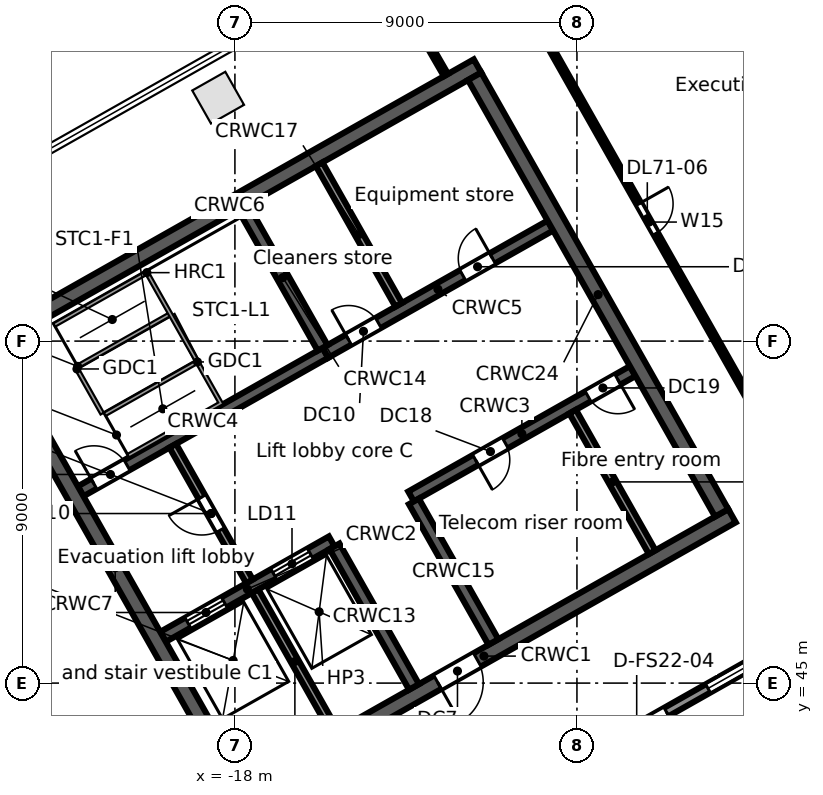
"""IFC4 building model, lengths in metres.
Left out: names, types, materials, properties, quantities, classifications, styles, units other than length and angle.
Written with IfcOpenShell. Run it as: python <this file> out.ifc"""

import sys

from ifc_helpers import new_model, si_unit, direction, frame, frame_2d, origin, origin_2d, place, context, subcontext, project, spatial, rectangle, extrude, element, fill, save


model = new_model("IFC4")
c1 = context("Model", 3, precision=1e-05, world=origin(), true_north=direction((0.0, 1.0)))
c2 = subcontext(c1, "Body", "Model", "MODEL_VIEW")
j1 = project(units=[si_unit("LENGTHUNIT", "METRE"), si_unit("PLANEANGLEUNIT", "RADIAN")], contexts=[c1])
p1 = place(None, origin())
s1 = spatial("IfcSite", under=j1, at=p1, CompositionType="ELEMENT")
p2 = place(p1, origin())
s2 = spatial("IfcBuilding", under=s1, at=p2, CompositionType="ELEMENT")
p3 = place(p2, frame((0.0, 0.0, 324.1)))
s3 = spatial("IfcBuildingStorey", under=s2, at=p3, CompositionType="ELEMENT", Elevation=324.1)
p4 = place(p3, frame((-18.441, 60.406, 0.0), z_axis=(0.0, 0.0, 1.0), x_axis=(-0.87035569594, -0.492423560103, 0.0)))
e1 = element("IfcColumn", 1, at=p4, inside=s3, PredefinedType="COLUMN", context=c2, shape_type="SweptSolid", body=[
    extrude(rectangle(XDim=1.0, YDim=1.0, at=origin_2d()), origin(), (0.0, 0.0, 1.0), 3.8),
])
p5 = place(p3, frame((-3.017, 46.293, 0.0), z_axis=(0.0, 0.0, 1.0), x_axis=(-0.870355474887, -0.492423950812, 0.0)))
e2 = element("IfcWall", 2, at=p5, inside=s3, PredefinedType="STANDARD", context=c2, shape_type="SweptSolid", body=[
    extrude(rectangle(XDim=40.34, YDim=0.25, at=frame_2d((20.17, 0.0))), origin(), (0.0, 0.0, 1.0), 3.52),
])
p6 = place(p5, frame((37.428, 0.0, 0.8)))
e3 = element("IfcOpeningElement", 3, at=p6, cuts=e2, PredefinedType="OPENING", context=c2, shape_type="SweptSolid", body=[
    extrude(rectangle(XDim=2.4, YDim=2.2, at=frame_2d((1.2, 1.1))), frame((0.0, 0.135, 0.0), z_axis=(0.0, -1.0, 0.0), x_axis=(1.0, 0.0, 0.0)), (0.0, 0.0, 1.0), 0.27),
])
p7 = place(p5, frame((34.372, 0.0, 0.0)))
e4 = element("IfcOpeningElement", 4, at=p7, cuts=e2, PredefinedType="OPENING", context=c2, shape_type="SweptSolid", body=[
    extrude(rectangle(XDim=1.8, YDim=2.4, at=frame_2d((0.9, 1.2))), frame((0.0, 0.135, 0.0), z_axis=(0.0, -1.0, 0.0), x_axis=(1.0, 0.0, 0.0)), (0.0, 0.0, 1.0), 0.27),
])
p8 = place(p5, frame((30.716, 0.0, 0.8)))
e5 = element("IfcOpeningElement", 5, at=p8, cuts=e2, PredefinedType="OPENING", context=c2, shape_type="SweptSolid", body=[
    extrude(rectangle(XDim=2.4, YDim=2.2, at=frame_2d((1.2, 1.1))), frame((0.0, 0.135, 0.0), z_axis=(0.0, -1.0, 0.0), x_axis=(1.0, 0.0, 0.0)), (0.0, 0.0, 1.0), 0.27),
])
p9 = place(p5, frame((27.36, 0.0, 0.8)))
e6 = element("IfcOpeningElement", 6, at=p9, cuts=e2, PredefinedType="OPENING", context=c2, shape_type="SweptSolid", body=[
    extrude(rectangle(XDim=2.4, YDim=2.2, at=frame_2d((1.2, 1.1))), frame((0.0, 0.135, 0.0), z_axis=(0.0, -1.0, 0.0), x_axis=(1.0, 0.0, 0.0)), (0.0, 0.0, 1.0), 0.27),
])
p10 = place(p5, frame((24.304, 0.0, 0.0)))
e7 = element("IfcOpeningElement", 7, at=p10, cuts=e2, PredefinedType="OPENING", context=c2, shape_type="SweptSolid", body=[
    extrude(rectangle(XDim=1.8, YDim=2.4, at=frame_2d((0.9, 1.2))), frame((0.0, 0.135, 0.0), z_axis=(0.0, -1.0, 0.0), x_axis=(1.0, 0.0, 0.0)), (0.0, 0.0, 1.0), 0.27),
])
p11 = place(p5, frame((20.648, 0.0, 0.8)))
e8 = element("IfcOpeningElement", 8, at=p11, cuts=e2, PredefinedType="OPENING", context=c2, shape_type="SweptSolid", body=[
    extrude(rectangle(XDim=2.4, YDim=2.2, at=frame_2d((1.2, 1.1))), frame((0.0, 0.135, 0.0), z_axis=(0.0, -1.0, 0.0), x_axis=(1.0, 0.0, 0.0)), (0.0, 0.0, 1.0), 0.27),
])
p12 = place(p5, frame((17.292, 0.0, 0.8)))
e9 = element("IfcOpeningElement", 9, at=p12, cuts=e2, PredefinedType="OPENING", context=c2, shape_type="SweptSolid", body=[
    extrude(rectangle(XDim=2.4, YDim=2.2, at=frame_2d((1.2, 1.1))), frame((0.0, 0.135, 0.0), z_axis=(0.0, -1.0, 0.0), x_axis=(1.0, 0.0, 0.0)), (0.0, 0.0, 1.0), 0.27),
])
p13 = place(p5, frame((14.236, 0.0, 0.0)))
e10 = element("IfcOpeningElement", 10, at=p13, cuts=e2, PredefinedType="OPENING", context=c2, shape_type="SweptSolid", body=[
    extrude(rectangle(XDim=1.8, YDim=2.4, at=frame_2d((0.9, 1.2))), frame((0.0, 0.135, 0.0), z_axis=(0.0, -1.0, 0.0), x_axis=(1.0, 0.0, 0.0)), (0.0, 0.0, 1.0), 0.27),
])
p14 = place(p5, frame((10.58, 0.0, 0.8)))
e11 = element("IfcOpeningElement", 11, at=p14, cuts=e2, PredefinedType="OPENING", context=c2, shape_type="SweptSolid", body=[
    extrude(rectangle(XDim=2.4, YDim=2.2, at=frame_2d((1.2, 1.1))), frame((0.0, 0.135, 0.0), z_axis=(0.0, -1.0, 0.0), x_axis=(1.0, 0.0, 0.0)), (0.0, 0.0, 1.0), 0.27),
])
p15 = place(p5, frame((7.224, 0.0, 0.8)))
e12 = element("IfcOpeningElement", 12, at=p15, cuts=e2, PredefinedType="OPENING", context=c2, shape_type="SweptSolid", body=[
    extrude(rectangle(XDim=2.4, YDim=2.2, at=frame_2d((1.2, 1.1))), frame((0.0, 0.135, 0.0), z_axis=(0.0, -1.0, 0.0), x_axis=(1.0, 0.0, 0.0)), (0.0, 0.0, 1.0), 0.27),
])
p16 = place(p5, frame((4.168, 0.0, 0.0)))
e13 = element("IfcOpeningElement", 13, at=p16, cuts=e2, PredefinedType="OPENING", context=c2, shape_type="SweptSolid", body=[
    extrude(rectangle(XDim=1.8, YDim=2.4, at=frame_2d((0.9, 1.2))), frame((0.0, 0.135, 0.0), z_axis=(0.0, -1.0, 0.0), x_axis=(1.0, 0.0, 0.0)), (0.0, 0.0, 1.0), 0.27),
])
p17 = place(p5, frame((0.512, 0.0, 0.8)))
e14 = element("IfcOpeningElement", 14, at=p17, cuts=e2, PredefinedType="OPENING", context=c2, shape_type="SweptSolid", body=[
    extrude(rectangle(XDim=2.4, YDim=2.2, at=frame_2d((1.2, 1.1))), frame((0.0, 0.135, 0.0), z_axis=(0.0, -1.0, 0.0), x_axis=(1.0, 0.0, 0.0)), (0.0, 0.0, 1.0), 0.27),
])
p18 = place(p3, frame((-17.975, 42.017, 0.0), z_axis=(0.0, 0.0, 1.0), x_axis=(0.87034965173, 0.492434243055, 0.0)))
e15 = element("IfcWall", 15, at=p18, inside=s3, PredefinedType="SOLIDWALL", context=c2, shape_type="SweptSolid", body=[
    extrude(rectangle(XDim=15.0, YDim=0.4, at=frame_2d((7.5, 0.0))), origin(), (0.0, 0.0, 1.0), 3.52),
])
p19 = place(p18, frame((6.1, 0.0, 0.0)))
e16 = element("IfcOpeningElement", 16, at=p19, cuts=e15, PredefinedType="OPENING", context=c2, shape_type="SweptSolid", body=[
    extrude(rectangle(XDim=1.2, YDim=2.1, at=frame_2d((0.6, 1.05))), frame((0.0, 0.21, 0.0), z_axis=(0.0, -1.0, 0.0), x_axis=(1.0, 0.0, 0.0)), (0.0, 0.0, 1.0), 0.42),
])
p20 = place(p3, frame((-19.892, 46.218, 0.0), z_axis=(0.0, 0.0, 1.0), x_axis=(0.870341639186, 0.492448404505, 0.0)))
e17 = element("IfcWall", 17, at=p20, inside=s3, PredefinedType="SOLIDWALL", context=c2, shape_type="SweptSolid", body=[
    extrude(rectangle(XDim=5.1, YDim=0.3, at=frame_2d((2.55, 0.0))), origin(), (0.0, 0.0, 1.0), 3.52),
])
p21 = place(p20, frame((0.75, 0.0, 0.0)))
e18 = element("IfcOpeningElement", 18, at=p21, cuts=e17, PredefinedType="OPENING", context=c2, shape_type="SweptSolid", body=[
    extrude(rectangle(XDim=1.1, YDim=2.1, at=frame_2d((0.55, 1.05))), frame((0.0, 0.16, 0.0), z_axis=(0.0, -1.0, 0.0), x_axis=(1.0, 0.0, 0.0)), (0.0, 0.0, 1.0), 0.32),
])
p22 = place(p20, frame((3.35, 0.0, 0.0)))
e19 = element("IfcOpeningElement", 19, at=p22, cuts=e17, PredefinedType="OPENING", context=c2, shape_type="SweptSolid", body=[
    extrude(rectangle(XDim=1.1, YDim=2.1, at=frame_2d((0.55, 1.05))), frame((0.0, 0.16, 0.0), z_axis=(0.0, -1.0, 0.0), x_axis=(1.0, 0.0, 0.0)), (0.0, 0.0, 1.0), 0.32),
])
p23 = place(p3, frame((-13.365, 49.911, 0.0), z_axis=(0.0, 0.0, 1.0), x_axis=(0.870347618718, 0.492437836272, 0.0)))
e20 = element("IfcWall", 20, at=p23, inside=s3, PredefinedType="SOLIDWALL", context=c2, shape_type="SweptSolid", body=[
    extrude(rectangle(XDim=6.7, YDim=0.3, at=frame_2d((3.35, 0.0))), origin(), (0.0, 0.0, 1.0), 3.52),
])
p24 = place(p23, frame((1.95, 0.0, 0.0)))
e21 = element("IfcOpeningElement", 21, at=p24, cuts=e20, PredefinedType="OPENING", context=c2, shape_type="SweptSolid", body=[
    extrude(rectangle(XDim=0.9, YDim=2.1, at=frame_2d((0.45, 1.05))), frame((0.0, 0.16, 0.0), z_axis=(0.0, -1.0, 0.0), x_axis=(1.0, 0.0, 0.0)), (0.0, 0.0, 1.0), 0.32),
])
p25 = place(p23, frame((5.35, 0.0, 0.0)))
e22 = element("IfcOpeningElement", 22, at=p25, cuts=e20, PredefinedType="OPENING", context=c2, shape_type="SweptSolid", body=[
    extrude(rectangle(XDim=0.9, YDim=2.1, at=frame_2d((0.45, 1.05))), frame((0.0, 0.16, 0.0), z_axis=(0.0, -1.0, 0.0), x_axis=(1.0, 0.0, 0.0)), (0.0, 0.0, 1.0), 0.32),
])
p26 = place(p3, frame((-22.059, 50.047, 0.0), z_axis=(0.0, 0.0, 1.0), x_axis=(0.87035077051, 0.49243226567, 0.0)))
e23 = element("IfcWall", 23, at=p26, inside=s3, PredefinedType="SOLIDWALL", context=c2, shape_type="SweptSolid", body=[
    extrude(rectangle(XDim=7.4, YDim=0.3, at=frame_2d((3.7, 0.0))), origin(), (0.0, 0.0, 1.0), 3.52),
])
p27 = place(p26, frame((0.4, 0.0, 0.0)))
e24 = element("IfcOpeningElement", 24, at=p27, cuts=e23, PredefinedType="OPENING", context=c2, shape_type="SweptSolid", body=[
    extrude(rectangle(XDim=1.0, YDim=2.1, at=frame_2d((0.5, 1.05))), frame((0.0, 0.16, 0.0), z_axis=(0.0, -1.0, 0.0), x_axis=(1.0, 0.0, 0.0)), (0.0, 0.0, 1.0), 0.32),
])
p28 = place(p3, frame((-15.618, 53.691, 0.0), z_axis=(0.0, 0.0, 1.0), x_axis=(0.870362830851, 0.492410948978, 0.0)))
e25 = element("IfcWall", 25, at=p28, inside=s3, PredefinedType="SOLIDWALL", context=c2, shape_type="SweptSolid", body=[
    extrude(rectangle(XDim=6.8, YDim=0.3, at=frame_2d((3.4, 0.0))), origin(), (0.0, 0.0, 1.0), 3.52),
])
p29 = place(p28, frame((0.7, 0.0, 0.0)))
e26 = element("IfcOpeningElement", 26, at=p29, cuts=e25, PredefinedType="OPENING", context=c2, shape_type="SweptSolid", body=[
    extrude(rectangle(XDim=0.9, YDim=2.1, at=frame_2d((0.45, 1.05))), frame((0.0, 0.16, 0.0), z_axis=(0.0, -1.0, 0.0), x_axis=(1.0, 0.0, 0.0)), (0.0, 0.0, 1.0), 0.32),
])
p30 = place(p28, frame((4.15, 0.0, 0.0)))
e27 = element("IfcOpeningElement", 27, at=p30, cuts=e25, PredefinedType="OPENING", context=c2, shape_type="SweptSolid", body=[
    extrude(rectangle(XDim=0.9, YDim=2.1, at=frame_2d((0.45, 1.05))), frame((0.0, 0.16, 0.0), z_axis=(0.0, -1.0, 0.0), x_axis=(1.0, 0.0, 0.0)), (0.0, 0.0, 1.0), 0.32),
])
p31 = place(p3, frame((-24.672, 53.854, 0.0), z_axis=(0.0, 0.0, 1.0), x_axis=(0.870353598469, 0.492427267353, 0.0)))
e28 = element("IfcWall", 28, at=p31, inside=s3, PredefinedType="SOLIDWALL", context=c2, shape_type="SweptSolid", body=[
    extrude(rectangle(XDim=15.0, YDim=0.4, at=frame_2d((7.5, 0.0))), origin(), (0.0, 0.0, 1.0), 3.52),
])
p32 = place(p3, frame((-24.4, 53.779, 0.0), z_axis=(0.0, 0.0, 1.0), x_axis=(0.492421663121, -0.870356769198, 0.0)))
e29 = element("IfcWall", 29, at=p32, inside=s3, PredefinedType="SOLIDWALL", context=c2, shape_type="SweptSolid", body=[
    extrude(rectangle(XDim=13.2, YDim=0.4, at=frame_2d((6.6, 0.0))), origin(), (0.0, 0.0, 1.0), 3.52),
])
p33 = place(p3, frame((-17.469, 47.417, 0.0), z_axis=(0.0, 0.0, 1.0), x_axis=(0.492466057713, -0.870331650579, 0.0)))
e30 = element("IfcWall", 30, at=p33, inside=s3, PredefinedType="SOLIDWALL", context=c2, shape_type="SweptSolid", body=[
    extrude(rectangle(XDim=4.25, YDim=0.2, at=frame_2d((2.125, 0.0))), origin(), (0.0, 0.0, 1.0), 3.52),
])
p34 = place(p3, frame((-19.635, 51.246, 0.0), z_axis=(0.0, 0.0, 1.0), x_axis=(0.492408451753, -0.87036424366, 0.0)))
e31 = element("IfcWall", 31, at=p34, inside=s3, PredefinedType="PARTITIONING", context=c2, shape_type="SweptSolid", body=[
    extrude(rectangle(XDim=4.1, YDim=0.2, at=frame_2d((2.05, 0.0))), origin(), (0.0, 0.0, 1.0), 3.52),
])
p35 = place(p34, frame((1.55, 0.0, 0.0)))
e32 = element("IfcOpeningElement", 32, at=p35, cuts=e31, PredefinedType="OPENING", context=c2, shape_type="SweptSolid", body=[
    extrude(rectangle(XDim=1.0, YDim=2.1, at=frame_2d((0.5, 1.05))), frame((0.0, 0.11, 0.0), z_axis=(0.0, -1.0, 0.0), x_axis=(1.0, 0.0, 0.0)), (0.0, 0.0, 1.0), 0.22),
])
for number, where, z_axis, x_axis in (
    (33, (-15.379, 48.599, 0.0), (0.0, 0.0, 1.0), (0.492, -0.87, 0.0)),
    (34, (-17.785, 57.521, 0.0), (0.0, 0.0, 1.0), (0.492, -0.87, 0.0)),
):
    element("IfcWall", number, at=place(p3, frame(where, z_axis=z_axis, x_axis=x_axis)), inside=s3, PredefinedType="SOLIDWALL", context=c2, shape_type="SweptSolid", body=[
        extrude(rectangle(XDim=4.25, YDim=0.3, at=frame_2d((2.125, 0.0))), origin(), (0.0, 0.0, 1.0), 3.52),
    ])
p36 = place(p3, frame((-13.291, 49.781, 0.0), z_axis=(0.0, 0.0, 1.0), x_axis=(0.492397924348, -0.870370199454, 0.0)))
e35 = element("IfcWall", 35, at=p36, inside=s3, PredefinedType="SOLIDWALL", context=c2, shape_type="SweptSolid", body=[
    extrude(rectangle(XDim=4.25, YDim=0.3, at=frame_2d((2.125, 0.0))), origin(), (0.0, 0.0, 1.0), 3.52),
])
p37 = place(p3, frame((-15.783, 58.654, 0.0), z_axis=(0.0, 0.0, 1.0), x_axis=(0.492441437811, -0.870345580977, 0.0)))
e36 = element("IfcWall", 36, at=p37, inside=s3, PredefinedType="PARTITIONING", context=c2, shape_type="SweptSolid", body=[
    extrude(rectangle(XDim=4.25, YDim=0.2, at=frame_2d((2.125, 0.0))), origin(), (0.0, 0.0, 1.0), 3.52),
])
p38 = place(p3, frame((-9.113, 52.144, 0.0), z_axis=(0.0, 0.0, 1.0), x_axis=(0.492422543467, -0.870356271124, 0.0)))
e37 = element("IfcWall", 37, at=p38, inside=s3, PredefinedType="PARTITIONING", context=c2, shape_type="SweptSolid", body=[
    extrude(rectangle(XDim=4.25, YDim=0.2, at=frame_2d((2.125, 0.0))), origin(), (0.0, 0.0, 1.0), 3.52),
])
p39 = place(p3, frame((-11.692, 60.968, 0.0), z_axis=(0.0, 0.0, 1.0), x_axis=(0.492421663121, -0.870356769198, 0.0)))
e38 = element("IfcWall", 38, at=p39, inside=s3, PredefinedType="SOLIDWALL", context=c2, shape_type="SweptSolid", body=[
    extrude(rectangle(XDim=13.2, YDim=0.4, at=frame_2d((6.6, 0.0))), origin(), (0.0, 0.0, 1.0), 3.52),
])
p40 = place(p3, frame((-14.141, 63.93, 0.0), z_axis=(0.0, 0.0, 1.0), x_axis=(0.500677851844, -0.865633691969, 0.0)))
e39 = element("IfcWall", 39, at=p40, inside=s3, PredefinedType="PARTITIONING", context=c2, shape_type="SweptSolid", body=[
    extrude(rectangle(XDim=3.384, YDim=0.125, at=frame_2d((1.692, 0.0))), origin(), (0.0, 0.0, 1.0), 2.888),
])
p41 = place(p3, frame((-10.054, 62.355, 0.0), z_axis=(0.0, 0.0, 1.0), x_axis=(0.49244734164, -0.870342240565, 0.0)))
e40 = element("IfcWall", 40, at=p41, inside=s3, PredefinedType="PARTITIONING", context=c2, shape_type="SweptSolid", body=[
    extrude(rectangle(XDim=12.001, YDim=0.125, at=frame_2d((6.0, 0.0))), origin(), (0.0, 0.0, 1.0), 2.7),
])
p42 = place(p41, frame((5.45, 0.0, 0.0)))
e41 = element("IfcOpeningElement", 41, at=p42, cuts=e40, PredefinedType="OPENING", context=c2, shape_type="SweptSolid", body=[
    extrude(rectangle(XDim=0.9, YDim=2.1, at=frame_2d((0.45, 1.05))), frame((0.0, 0.073, 0.0), z_axis=(0.0, -1.0, 0.0), x_axis=(1.0, 0.0, 0.0)), (0.0, 0.0, 1.0), 0.145),
])
p43 = place(p16, origin())
e42 = element("IfcDoor", 42, at=p43, inside=s3, OperationType="DOUBLE_DOOR_SINGLE_SWING", PredefinedType="DOOR", context=c2, shape_type="SweptSolid", body=[
    extrude(rectangle(XDim=1.8, YDim=2.4, at=frame_2d((0.9, 1.2))), frame((0.0, 0.025, 0.0), z_axis=(0.0, -1.0, 0.0), x_axis=(1.0, 0.0, 0.0)), (0.0, 0.0, 1.0), 0.05),
])
fill(e13, e42)
p44 = place(p17, origin())
e43 = element("IfcWindow", 43, at=p44, inside=s3, PartitioningType="SINGLE_PANEL", PredefinedType="WINDOW", context=c2, shape_type="SweptSolid", body=[
    extrude(rectangle(XDim=2.4, YDim=2.2, at=frame_2d((1.2, 1.1))), frame((0.0, 0.03, 0.0), z_axis=(0.0, -1.0, 0.0), x_axis=(1.0, 0.0, 0.0)), (0.0, 0.0, 1.0), 0.06),
])
fill(e14, e43)
p45 = place(p21, origin())
e44 = element("IfcDoor", 44, at=p45, inside=s3, OperationType="DOUBLE_DOOR_SLIDING", PredefinedType="DOOR", context=c2, shape_type="SweptSolid", body=[
    extrude(rectangle(XDim=1.1, YDim=2.1, at=frame_2d((0.55, 1.05))), frame((0.0, 0.025, 0.0), z_axis=(0.0, -1.0, 0.0), x_axis=(1.0, 0.0, 0.0)), (0.0, 0.0, 1.0), 0.05),
])
fill(e18, e44)
p46 = place(p22, origin())
e45 = element("IfcDoor", 45, at=p46, inside=s3, OperationType="DOUBLE_DOOR_SLIDING", PredefinedType="DOOR", context=c2, shape_type="SweptSolid", body=[
    extrude(rectangle(XDim=1.1, YDim=2.1, at=frame_2d((0.55, 1.05))), frame((0.0, 0.025, 0.0), z_axis=(0.0, -1.0, 0.0), x_axis=(1.0, 0.0, 0.0)), (0.0, 0.0, 1.0), 0.05),
])
fill(e19, e45)
p47 = place(p27, origin())
e46 = element("IfcDoor", 46, at=p47, inside=s3, OperationType="SINGLE_SWING_LEFT", PredefinedType="DOOR", context=c2, shape_type="SweptSolid", body=[
    extrude(rectangle(XDim=1.0, YDim=2.1, at=frame_2d((0.5, 1.05))), frame((0.0, 0.025, 0.0), z_axis=(0.0, -1.0, 0.0), x_axis=(1.0, 0.0, 0.0)), (0.0, 0.0, 1.0), 0.05),
])
fill(e24, e46)
p48 = place(p35, frame((1.0, 0.0, 0.0), z_axis=(0.0, 0.0, 1.0), x_axis=(-1.0, 0.0, 0.0)))
e47 = element("IfcDoor", 47, at=p48, inside=s3, OperationType="SINGLE_SWING_RIGHT", PredefinedType="DOOR", context=c2, shape_type="SweptSolid", body=[
    extrude(rectangle(XDim=1.0, YDim=2.1, at=frame_2d((0.5, 1.05))), frame((0.0, 0.025, 0.0), z_axis=(0.0, -1.0, 0.0), x_axis=(1.0, 0.0, 0.0)), (0.0, 0.0, 1.0), 0.05),
])
fill(e32, e47)
p49 = place(p19, frame((1.2, 0.0, 0.0), z_axis=(0.0, 0.0, 1.0), x_axis=(-1.0, 0.0, 0.0)))
e48 = element("IfcDoor", 48, at=p49, inside=s3, OperationType="SINGLE_SWING_RIGHT", PredefinedType="DOOR", context=c2, shape_type="SweptSolid", body=[
    extrude(rectangle(XDim=1.2, YDim=2.1, at=frame_2d((0.6, 1.05))), frame((0.0, 0.025, 0.0), z_axis=(0.0, -1.0, 0.0), x_axis=(1.0, 0.0, 0.0)), (0.0, 0.0, 1.0), 0.05),
])
fill(e16, e48)
p50 = place(p29, origin())
e49 = element("IfcDoor", 49, at=p50, inside=s3, OperationType="SINGLE_SWING_LEFT", PredefinedType="DOOR", context=c2, shape_type="SweptSolid", body=[
    extrude(rectangle(XDim=0.9, YDim=2.1, at=frame_2d((0.45, 1.05))), frame((0.0, 0.025, 0.0), z_axis=(0.0, -1.0, 0.0), x_axis=(1.0, 0.0, 0.0)), (0.0, 0.0, 1.0), 0.05),
])
fill(e26, e49)
p51 = place(p30, origin())
e50 = element("IfcDoor", 50, at=p51, inside=s3, OperationType="SINGLE_SWING_RIGHT", PredefinedType="DOOR", context=c2, shape_type="SweptSolid", body=[
    extrude(rectangle(XDim=0.9, YDim=2.1, at=frame_2d((0.45, 1.05))), frame((0.0, 0.025, 0.0), z_axis=(0.0, -1.0, 0.0), x_axis=(1.0, 0.0, 0.0)), (0.0, 0.0, 1.0), 0.05),
])
fill(e27, e50)
p52 = place(p24, frame((0.9, 0.0, 0.0), z_axis=(0.0, 0.0, 1.0), x_axis=(-1.0, 0.0, 0.0)))
e51 = element("IfcDoor", 51, at=p52, inside=s3, OperationType="SINGLE_SWING_RIGHT", PredefinedType="DOOR", context=c2, shape_type="SweptSolid", body=[
    extrude(rectangle(XDim=0.9, YDim=2.1, at=frame_2d((0.45, 1.05))), frame((0.0, 0.025, 0.0), z_axis=(0.0, -1.0, 0.0), x_axis=(1.0, 0.0, 0.0)), (0.0, 0.0, 1.0), 0.05),
])
fill(e21, e51)
p53 = place(p25, frame((0.9, 0.0, 0.0), z_axis=(0.0, 0.0, 1.0), x_axis=(-1.0, 0.0, 0.0)))
e52 = element("IfcDoor", 52, at=p53, inside=s3, OperationType="SINGLE_SWING_LEFT", PredefinedType="DOOR", context=c2, shape_type="SweptSolid", body=[
    extrude(rectangle(XDim=0.9, YDim=2.1, at=frame_2d((0.45, 1.05))), frame((0.0, 0.025, 0.0), z_axis=(0.0, -1.0, 0.0), x_axis=(1.0, 0.0, 0.0)), (0.0, 0.0, 1.0), 0.05),
])
fill(e22, e52)
p54 = place(p42, origin())
e53 = element("IfcDoor", 53, at=p54, inside=s3, OperationType="SINGLE_SWING_LEFT", PredefinedType="DOOR", context=c2, shape_type="SweptSolid", body=[
    extrude(rectangle(XDim=0.9, YDim=2.1, at=frame_2d((0.45, 1.05))), frame((0.0, 0.025, 0.0), z_axis=(0.0, -1.0, 0.0), x_axis=(1.0, 0.0, 0.0)), (0.0, 0.0, 1.0), 0.05),
])
fill(e41, e53)
save(model, sys.argv[1])
